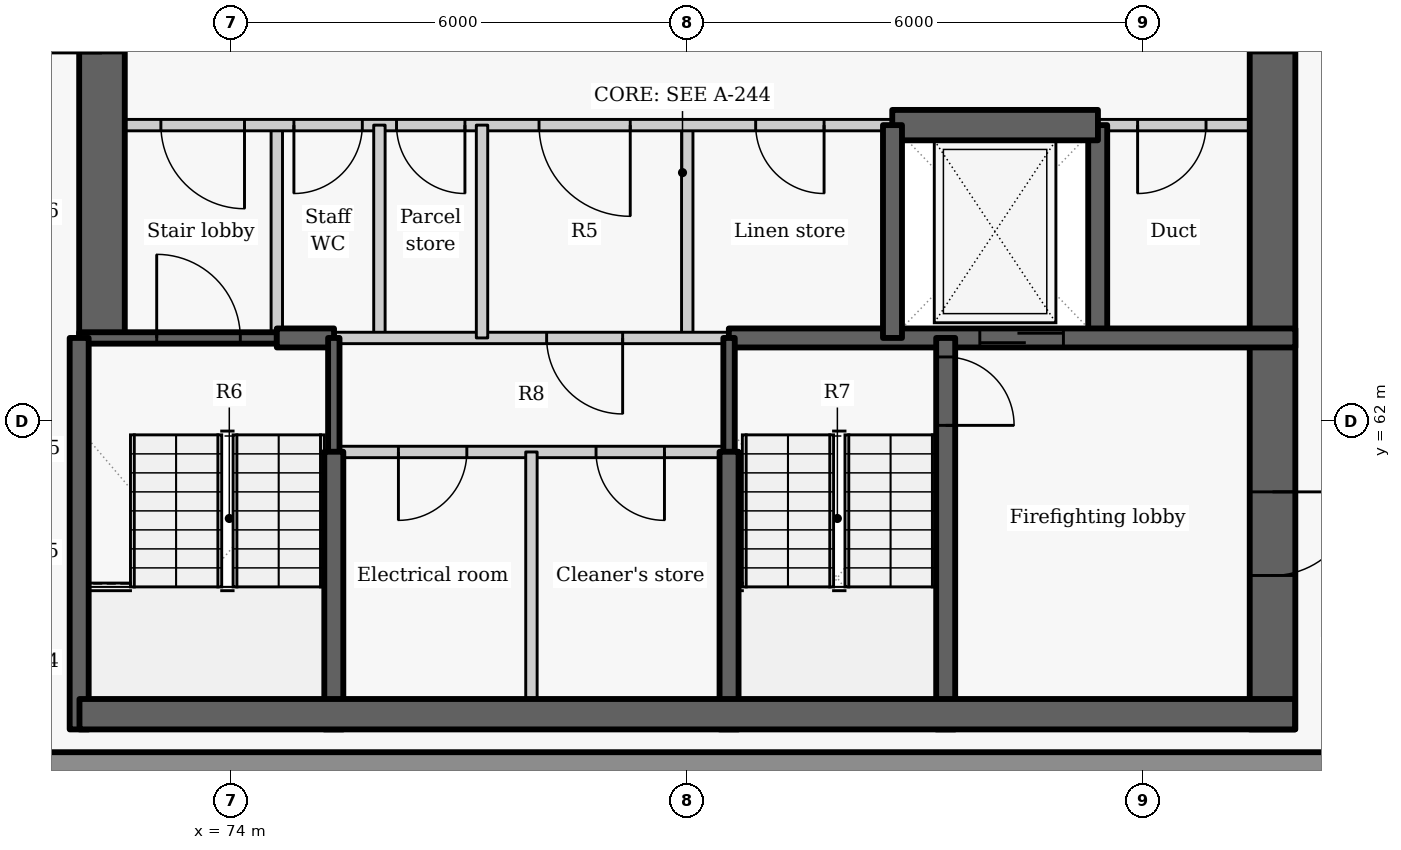
"""IFC4 building model, lengths in metres.
Left out: names, types, materials, properties, quantities, classifications, styles, units other than length and angle.
Written with IfcOpenShell. Run it as: python <this file> out.ifc"""

import sys

from ifc_helpers import new_model, si_unit, direction, frame, frame_2d, origin, place, context, subcontext, project, spatial, rectangle, extrude, element, fill, save


model = new_model("IFC4")
c1 = context("Model", 3, precision=1e-05, world=origin(), true_north=direction((0.0, 1.0)))
c2 = subcontext(c1, "Body", "Model", "MODEL_VIEW")
j1 = project(units=[si_unit("LENGTHUNIT", "METRE"), si_unit("PLANEANGLEUNIT", "RADIAN")], contexts=[c1])
p1 = place(None, origin())
s1 = spatial("IfcSite", under=j1, at=p1, CompositionType="ELEMENT")
p2 = place(p1, origin())
s2 = spatial("IfcBuilding", under=s1, at=p2, CompositionType="ELEMENT")
p3 = place(p2, frame((0.0, 0.0, 269.1)))
s3 = spatial("IfcBuildingStorey", under=s2, at=p3, CompositionType="ELEMENT", Elevation=269.1)
p4 = place(p3, frame((70.501, 57.5, 0.0), z_axis=(0.0, 0.0, 1.0), x_axis=(1.0, 0.0, 0.0)))
e1 = element("IfcWall", 1, at=p4, inside=s3, PredefinedType="SOLIDWALL", context=c2, shape_type="SweptSolid", body=[
    extrude(rectangle(XDim=18.993, YDim=0.3, at=frame_2d((9.496, 0.0))), origin(), (0.0, 0.0, 1.0), 2.125),
])
p5 = place(p3, frame((74.6, 63.1, 0.0), z_axis=(0.0, 0.0, 1.0), x_axis=(0.0, 1.0, 0.0)))
e2 = element("IfcWall", 2, at=p5, inside=s3, PredefinedType="PARTITIONING", context=c2, shape_type="SweptSolid", body=[
    extrude(rectangle(XDim=2.8, YDim=0.15, at=frame_2d((1.4, 0.0))), origin(), (0.0, 0.0, 1.0), 3.025),
])
p6 = place(p3, frame((72.3, 63.1, -0.275), z_axis=(0.0, 0.0, 1.0), x_axis=(0.0, 1.0, 0.0)))
e3 = element("IfcWall", 3, at=p6, inside=s3, PredefinedType="SHEAR", context=c2, shape_type="SweptSolid", body=[
    extrude(rectangle(XDim=9.1, YDim=0.6, at=frame_2d((4.55, 0.0))), origin(), (0.0, 0.0, 1.0), 3.3),
])
p7 = place(p6, frame((3.75, 0.0, 0.275)))
e4 = element("IfcOpeningElement", 4, at=p7, cuts=e3, PredefinedType="OPENING", context=c2, shape_type="SweptSolid", body=[
    extrude(rectangle(XDim=1.5, YDim=2.1, at=frame_2d((0.75, 1.05))), frame((0.0, 0.31, 0.0), z_axis=(0.0, -1.0, 0.0), x_axis=(1.0, 0.0, 0.0)), (0.0, 0.0, 1.0), 0.62),
])
p8 = place(p3, frame((85.4, 63.1, -0.275), z_axis=(0.0, 0.0, 1.0), x_axis=(0.0, 1.0, 0.0)))
e5 = element("IfcWall", 5, at=p8, inside=s3, PredefinedType="SHEAR", context=c2, shape_type="SweptSolid", body=[
    extrude(rectangle(XDim=2.8, YDim=0.25, at=frame_2d((1.4, 0.0))), origin(), (0.0, 0.0, 1.0), 3.3),
])
p9 = place(p3, frame((87.7, 72.2, -0.275), z_axis=(0.0, 0.0, 1.0), x_axis=(0.0, -1.0, 0.0)))
e6 = element("IfcWall", 6, at=p9, inside=s3, PredefinedType="SHEAR", context=c2, shape_type="SweptSolid", body=[
    extrude(rectangle(XDim=14.25, YDim=0.6, at=frame_2d((7.125, 0.0))), origin(), (0.0, 0.0, 1.0), 3.3),
])
p10 = place(p9, frame((3.85, 0.0, 0.275)))
e7 = element("IfcOpeningElement", 7, at=p10, cuts=e6, PredefinedType="OPENING", context=c2, shape_type="SweptSolid", body=[
    extrude(rectangle(XDim=1.5, YDim=2.1, at=frame_2d((0.75, 1.05))), frame((0.0, 0.31, 0.0), z_axis=(0.0, -1.0, 0.0), x_axis=(1.0, 0.0, 0.0)), (0.0, 0.0, 1.0), 0.62),
])
p11 = place(p9, frame((11.125, 0.0, 0.275)))
e8 = element("IfcOpeningElement", 8, at=p11, cuts=e6, PredefinedType="OPENING", context=c2, shape_type="SweptSolid", body=[
    extrude(rectangle(XDim=1.1, YDim=2.1, at=frame_2d((0.55, 1.05))), frame((0.0, 0.31, 0.0), z_axis=(0.0, -1.0, 0.0), x_axis=(1.0, 0.0, 0.0)), (0.0, 0.0, 1.0), 0.62),
])
p12 = place(p3, frame((80.0, 63.1, 0.0), z_axis=(0.0, 0.0, 1.0), x_axis=(0.0, 1.0, 0.0)))
e9 = element("IfcWall", 9, at=p12, inside=s3, PredefinedType="PARTITIONING", context=c2, shape_type="SweptSolid", body=[
    extrude(rectangle(XDim=2.8, YDim=0.15, at=frame_2d((1.4, 0.0))), origin(), (0.0, 0.0, 1.0), 3.025),
])
p13 = place(p3, frame((82.703, 65.9, 0.0), z_axis=(0.0, 0.0, 1.0), x_axis=(-1.0, 0.0, 0.0)))
e10 = element("IfcWall", 10, at=p13, inside=s3, PredefinedType="PARTITIONING", context=c2, shape_type="SweptSolid", body=[
    extrude(rectangle(XDim=10.703, YDim=0.15, at=frame_2d((5.352, 0.0))), origin(), (0.0, 0.0, 1.0), 3.025),
])
p14 = place(p13, frame((8.528, 0.0, 0.0)))
e11 = element("IfcOpeningElement", 11, at=p14, cuts=e10, PredefinedType="OPENING", context=c2, shape_type="SweptSolid", body=[
    extrude(rectangle(XDim=1.1, YDim=2.1, at=frame_2d((0.55, 1.05))), frame((0.0, 0.085, 0.0), z_axis=(0.0, -1.0, 0.0), x_axis=(1.0, 0.0, 0.0)), (0.0, 0.0, 1.0), 0.17),
])
p15 = place(p13, frame((6.978, 0.0, 0.0)))
e12 = element("IfcOpeningElement", 12, at=p15, cuts=e10, PredefinedType="OPENING", context=c2, shape_type="SweptSolid", body=[
    extrude(rectangle(XDim=0.9, YDim=2.1, at=frame_2d((0.45, 1.05))), frame((0.0, 0.085, 0.0), z_axis=(0.0, -1.0, 0.0), x_axis=(1.0, 0.0, 0.0)), (0.0, 0.0, 1.0), 0.17),
])
p16 = place(p13, frame((5.628, 0.0, 0.0)))
e13 = element("IfcOpeningElement", 13, at=p16, cuts=e10, PredefinedType="OPENING", context=c2, shape_type="SweptSolid", body=[
    extrude(rectangle(XDim=0.9, YDim=2.1, at=frame_2d((0.45, 1.05))), frame((0.0, 0.085, 0.0), z_axis=(0.0, -1.0, 0.0), x_axis=(1.0, 0.0, 0.0)), (0.0, 0.0, 1.0), 0.17),
])
p17 = place(p13, frame((3.453, 0.0, 0.0)))
e14 = element("IfcOpeningElement", 14, at=p17, cuts=e10, PredefinedType="OPENING", context=c2, shape_type="SweptSolid", body=[
    extrude(rectangle(XDim=1.2, YDim=2.1, at=frame_2d((0.6, 1.05))), frame((0.0, 0.085, 0.0), z_axis=(0.0, -1.0, 0.0), x_axis=(1.0, 0.0, 0.0)), (0.0, 0.0, 1.0), 0.17),
])
p18 = place(p13, frame((0.903, 0.0, 0.0)))
e15 = element("IfcOpeningElement", 15, at=p18, cuts=e10, PredefinedType="OPENING", context=c2, shape_type="SweptSolid", body=[
    extrude(rectangle(XDim=0.9, YDim=2.1, at=frame_2d((0.45, 1.05))), frame((0.0, 0.085, 0.0), z_axis=(0.0, -1.0, 0.0), x_axis=(1.0, 0.0, 0.0)), (0.0, 0.0, 1.0), 0.17),
])
p19 = place(p3, frame((88.0, 65.9, 0.0), z_axis=(0.0, 0.0, 1.0), x_axis=(-1.0, 0.0, 0.0)))
e16 = element("IfcWall", 16, at=p19, inside=s3, PredefinedType="PARTITIONING", context=c2, shape_type="SweptSolid", body=[
    extrude(rectangle(XDim=2.603, YDim=0.15, at=frame_2d((1.302, 0.0))), origin(), (0.0, 0.0, 1.0), 3.025),
])
p20 = place(p19, frame((1.175, 0.0, 0.0)))
e17 = element("IfcOpeningElement", 17, at=p20, cuts=e16, PredefinedType="OPENING", context=c2, shape_type="SweptSolid", body=[
    extrude(rectangle(XDim=0.9, YDim=2.1, at=frame_2d((0.45, 1.05))), frame((0.0, 0.085, 0.0), z_axis=(0.0, -1.0, 0.0), x_axis=(1.0, 0.0, 0.0)), (0.0, 0.0, 1.0), 0.17),
])
p21 = place(p3, frame((82.697, 65.9, -0.275), z_axis=(0.0, 0.0, 1.0), x_axis=(1.0, 0.0, 0.0)))
e18 = element("IfcWall", 18, at=p21, inside=s3, PredefinedType="SHEAR", context=c2, shape_type="SweptSolid", body=[
    extrude(rectangle(XDim=2.706, YDim=0.4, at=frame_2d((1.353, 0.0))), origin(), (0.0, 0.0, 1.0), 3.3),
])
p22 = place(p3, frame((72.0, 63.1, -0.275), z_axis=(0.0, 0.0, 1.0), x_axis=(1.0, 0.0, 0.0)))
e19 = element("IfcWall", 19, at=p22, inside=s3, PredefinedType="SHEAR", context=c2, shape_type="SweptSolid", body=[
    extrude(rectangle(XDim=2.6, YDim=0.15, at=frame_2d((1.3, 0.0))), origin(), (0.0, 0.0, 1.0), 3.3),
])
p23 = place(p22, frame((1.02, 0.0, 0.275)))
e20 = element("IfcOpeningElement", 20, at=p23, cuts=e19, PredefinedType="OPENING", context=c2, shape_type="SweptSolid", body=[
    extrude(rectangle(XDim=1.1, YDim=2.1, at=frame_2d((0.55, 1.05))), frame((0.0, 0.085, 0.0), z_axis=(0.0, -1.0, 0.0), x_axis=(1.0, 0.0, 0.0)), (0.0, 0.0, 1.0), 0.17),
])
p24 = place(p3, frame((75.95, 63.1, 0.0), z_axis=(0.0, 0.0, 1.0), x_axis=(0.0, 1.0, 0.0)))
e21 = element("IfcWall", 21, at=p24, inside=s3, PredefinedType="PARTITIONING", context=c2, shape_type="SweptSolid", body=[
    extrude(rectangle(XDim=2.8, YDim=0.15, at=frame_2d((1.4, 0.0))), origin(), (0.0, 0.0, 1.0), 3.025),
])
p25 = place(p3, frame((74.6, 63.1, -0.275), z_axis=(0.0, 0.0, 1.0), x_axis=(1.0, 0.0, 0.0)))
e22 = element("IfcWall", 22, at=p25, inside=s3, PredefinedType="SHEAR", context=c2, shape_type="SweptSolid", body=[
    extrude(rectangle(XDim=0.753, YDim=0.25, at=frame_2d((0.376, 0.0))), origin(), (0.0, 0.0, 1.0), 3.3),
])
p26 = place(p3, frame((80.547, 63.1, -0.275), z_axis=(0.0, 0.0, 1.0), x_axis=(1.0, 0.0, 0.0)))
e23 = element("IfcWall", 23, at=p26, inside=s3, PredefinedType="SHEAR", context=c2, shape_type="SweptSolid", body=[
    extrude(rectangle(XDim=7.453, YDim=0.25, at=frame_2d((3.727, 0.0))), origin(), (0.0, 0.0, 1.0), 3.3),
])
p27 = place(p26, frame((3.302, 0.0, 0.275)))
e24 = element("IfcOpeningElement", 24, at=p27, cuts=e23, PredefinedType="OPENING", context=c2, shape_type="SweptSolid", body=[
    extrude(rectangle(XDim=1.1, YDim=2.1, at=frame_2d((0.55, 1.05))), frame((0.0, 0.135, 0.0), z_axis=(0.0, -1.0, 0.0), x_axis=(1.0, 0.0, 0.0)), (0.0, 0.0, 1.0), 0.27),
])
p28 = place(p3, frame((80.553, 63.1, 0.0), z_axis=(0.0, 0.0, 1.0), x_axis=(-1.0, 0.0, 0.0)))
e25 = element("IfcWall", 25, at=p28, inside=s3, PredefinedType="PARTITIONING", context=c2, shape_type="SweptSolid", body=[
    extrude(rectangle(XDim=5.206, YDim=0.15, at=frame_2d((2.603, 0.0))), origin(), (0.0, 0.0, 1.0), 3.025),
])
p29 = place(p28, frame((1.403, 0.0, 0.0)))
e26 = element("IfcOpeningElement", 26, at=p29, cuts=e25, PredefinedType="OPENING", context=c2, shape_type="SweptSolid", body=[
    extrude(rectangle(XDim=1.0, YDim=2.1, at=frame_2d((0.5, 1.05))), frame((0.0, 0.085, 0.0), z_axis=(0.0, -1.0, 0.0), x_axis=(1.0, 0.0, 0.0)), (0.0, 0.0, 1.0), 0.17),
])
p30 = place(p3, frame((77.3, 63.1, 0.0), z_axis=(0.0, 0.0, 1.0), x_axis=(0.0, 1.0, 0.0)))
e27 = element("IfcWall", 27, at=p30, inside=s3, PredefinedType="PARTITIONING", context=c2, shape_type="SweptSolid", body=[
    extrude(rectangle(XDim=2.8, YDim=0.15, at=frame_2d((1.4, 0.0))), origin(), (0.0, 0.0, 1.0), 3.025),
])
p31 = place(p3, frame((82.7, 63.1, -0.275), z_axis=(0.0, 0.0, 1.0), x_axis=(0.0, 1.0, 0.0)))
e28 = element("IfcWall", 28, at=p31, inside=s3, PredefinedType="SHEAR", context=c2, shape_type="SweptSolid", body=[
    extrude(rectangle(XDim=2.8, YDim=0.25, at=frame_2d((1.4, 0.0))), origin(), (0.0, 0.0, 1.0), 3.3),
])
p32 = place(p3, frame((75.35, 61.597, -0.275), z_axis=(0.0, 0.0, 1.0), x_axis=(0.0, 1.0, 0.0)))
e29 = element("IfcWall", 29, at=p32, inside=s3, PredefinedType="SHEAR", context=c2, shape_type="SweptSolid", body=[
    extrude(rectangle(XDim=1.503, YDim=0.15, at=frame_2d((0.751, 0.0))), origin(), (0.0, 0.0, 1.0), 3.3),
])
p33 = place(p3, frame((75.35, 57.95, -0.275), z_axis=(0.0, 0.0, 1.0), x_axis=(0.0, 1.0, 0.0)))
e30 = element("IfcWall", 30, at=p33, inside=s3, PredefinedType="SHEAR", context=c2, shape_type="SweptSolid", body=[
    extrude(rectangle(XDim=3.653, YDim=0.25, at=frame_2d((1.827, 0.0))), origin(), (0.0, 0.0, 1.0), 3.3),
])
p34 = place(p3, frame((72.0, 57.95, -0.275), z_axis=(0.0, 0.0, 1.0), x_axis=(0.0, 1.0, 0.0)))
e31 = element("IfcWall", 31, at=p34, inside=s3, PredefinedType="SHEAR", context=c2, shape_type="SweptSolid", body=[
    extrude(rectangle(XDim=5.15, YDim=0.25, at=frame_2d((2.575, 0.0))), origin(), (0.0, 0.0, 1.0), 3.3),
])
p35 = place(p3, frame((83.4, 63.1, -0.275), z_axis=(0.0, 0.0, 1.0), x_axis=(0.0, -1.0, 0.0)))
e32 = element("IfcWall", 32, at=p35, inside=s3, PredefinedType="SHEAR", context=c2, shape_type="SweptSolid", body=[
    extrude(rectangle(XDim=5.15, YDim=0.25, at=frame_2d((2.575, 0.0))), origin(), (0.0, 0.0, 1.0), 3.3),
])
p36 = place(p35, frame((0.25, 0.0, 0.275)))
e33 = element("IfcOpeningElement", 33, at=p36, cuts=e32, PredefinedType="OPENING", context=c2, shape_type="SweptSolid", body=[
    extrude(rectangle(XDim=0.9, YDim=2.1, at=frame_2d((0.45, 1.05))), frame((0.0, 0.135, 0.0), z_axis=(0.0, -1.0, 0.0), x_axis=(1.0, 0.0, 0.0)), (0.0, 0.0, 1.0), 0.27),
])
p37 = place(p3, frame((80.55, 61.597, -0.275), z_axis=(0.0, 0.0, 1.0), x_axis=(0.0, 1.0, 0.0)))
e34 = element("IfcWall", 34, at=p37, inside=s3, PredefinedType="SHEAR", context=c2, shape_type="SweptSolid", body=[
    extrude(rectangle(XDim=1.503, YDim=0.15, at=frame_2d((0.751, 0.0))), origin(), (0.0, 0.0, 1.0), 3.3),
])
p38 = place(p3, frame((80.55, 57.95, -0.275), z_axis=(0.0, 0.0, 1.0), x_axis=(0.0, 1.0, 0.0)))
e35 = element("IfcWall", 35, at=p38, inside=s3, PredefinedType="SHEAR", context=c2, shape_type="SweptSolid", body=[
    extrude(rectangle(XDim=3.653, YDim=0.25, at=frame_2d((1.827, 0.0))), origin(), (0.0, 0.0, 1.0), 3.3),
])
p39 = place(p3, frame((80.55, 61.6, 0.0), z_axis=(0.0, 0.0, 1.0), x_axis=(-1.0, 0.0, 0.0)))
e36 = element("IfcWall", 36, at=p39, inside=s3, PredefinedType="PARTITIONING", context=c2, shape_type="SweptSolid", body=[
    extrude(rectangle(XDim=5.2, YDim=0.15, at=frame_2d((2.6, 0.0))), origin(), (0.0, 0.0, 1.0), 3.025),
])
p40 = place(p39, frame((3.45, 0.0, 0.0)))
e37 = element("IfcOpeningElement", 37, at=p40, cuts=e36, PredefinedType="OPENING", context=c2, shape_type="SweptSolid", body=[
    extrude(rectangle(XDim=0.9, YDim=2.1, at=frame_2d((0.45, 1.05))), frame((0.0, 0.085, 0.0), z_axis=(0.0, -1.0, 0.0), x_axis=(1.0, 0.0, 0.0)), (0.0, 0.0, 1.0), 0.17),
])
p41 = place(p39, frame((0.85, 0.0, 0.0)))
e38 = element("IfcOpeningElement", 38, at=p41, cuts=e36, PredefinedType="OPENING", context=c2, shape_type="SweptSolid", body=[
    extrude(rectangle(XDim=0.9, YDim=2.1, at=frame_2d((0.45, 1.05))), frame((0.0, 0.085, 0.0), z_axis=(0.0, -1.0, 0.0), x_axis=(1.0, 0.0, 0.0)), (0.0, 0.0, 1.0), 0.17),
])
p42 = place(p3, frame((77.95, 57.95, 0.0), z_axis=(0.0, 0.0, 1.0), x_axis=(0.0, 1.0, 0.0)))
e39 = element("IfcWall", 39, at=p42, inside=s3, PredefinedType="PARTITIONING", context=c2, shape_type="SweptSolid", body=[
    extrude(rectangle(XDim=3.65, YDim=0.15, at=frame_2d((1.825, 0.0))), origin(), (0.0, 0.0, 1.0), 3.025),
])
p43 = place(p3, frame((72.004, 58.15, -0.275), z_axis=(0.0, 0.0, 1.0), x_axis=(1.0, 0.0, 0.0)))
e40 = element("IfcWall", 40, at=p43, inside=s3, PredefinedType="SHEAR", context=c2, shape_type="SweptSolid", body=[
    extrude(rectangle(XDim=15.992, YDim=0.4, at=frame_2d((7.996, 0.0))), origin(), (0.0, 0.0, 1.0), 3.3),
])
p44 = place(p14, origin())
e41 = element("IfcDoor", 41, at=p44, inside=s3, OperationType="SINGLE_SWING_LEFT", PredefinedType="DOOR", context=c2, shape_type="SweptSolid", body=[
    extrude(rectangle(XDim=1.1, YDim=2.1, at=frame_2d((0.55, 1.05))), frame((0.0, 0.025, 0.0), z_axis=(0.0, -1.0, 0.0), x_axis=(1.0, 0.0, 0.0)), (0.0, 0.0, 1.0), 0.05),
])
fill(e11, e41)
p45 = place(p15, origin())
e42 = element("IfcDoor", 42, at=p45, inside=s3, OperationType="SINGLE_SWING_RIGHT", PredefinedType="DOOR", context=c2, shape_type="SweptSolid", body=[
    extrude(rectangle(XDim=0.9, YDim=2.1, at=frame_2d((0.45, 1.05))), frame((0.0, 0.025, 0.0), z_axis=(0.0, -1.0, 0.0), x_axis=(1.0, 0.0, 0.0)), (0.0, 0.0, 1.0), 0.05),
])
fill(e12, e42)
p46 = place(p16, origin())
e43 = element("IfcDoor", 43, at=p46, inside=s3, OperationType="SINGLE_SWING_LEFT", PredefinedType="DOOR", context=c2, shape_type="SweptSolid", body=[
    extrude(rectangle(XDim=0.9, YDim=2.1, at=frame_2d((0.45, 1.05))), frame((0.0, 0.025, 0.0), z_axis=(0.0, -1.0, 0.0), x_axis=(1.0, 0.0, 0.0)), (0.0, 0.0, 1.0), 0.05),
])
fill(e13, e43)
p47 = place(p17, origin())
e44 = element("IfcDoor", 44, at=p47, inside=s3, OperationType="DOUBLE_DOOR_SINGLE_SWING", PredefinedType="DOOR", context=c2, shape_type="SweptSolid", body=[
    extrude(rectangle(XDim=1.2, YDim=2.1, at=frame_2d((0.6, 1.05))), frame((0.0, 0.025, 0.0), z_axis=(0.0, -1.0, 0.0), x_axis=(1.0, 0.0, 0.0)), (0.0, 0.0, 1.0), 0.05),
])
fill(e14, e44)
p48 = place(p18, origin())
e45 = element("IfcDoor", 45, at=p48, inside=s3, OperationType="SINGLE_SWING_LEFT", PredefinedType="DOOR", context=c2, shape_type="SweptSolid", body=[
    extrude(rectangle(XDim=0.9, YDim=2.1, at=frame_2d((0.45, 1.05))), frame((0.0, 0.025, 0.0), z_axis=(0.0, -1.0, 0.0), x_axis=(1.0, 0.0, 0.0)), (0.0, 0.0, 1.0), 0.05),
])
fill(e15, e45)
p49 = place(p27, origin())
e46 = element("IfcDoor", 46, at=p49, inside=s3, OperationType="SLIDING_TO_LEFT", PredefinedType="DOOR", context=c2, shape_type="SweptSolid", body=[
    extrude(rectangle(XDim=1.1, YDim=2.1, at=frame_2d((0.55, 1.05))), frame((0.0, 0.025, 0.0), z_axis=(0.0, -1.0, 0.0), x_axis=(1.0, 0.0, 0.0)), (0.0, 0.0, 1.0), 0.05),
])
fill(e24, e46)
p50 = place(p20, origin())
e47 = element("IfcDoor", 47, at=p50, inside=s3, OperationType="SINGLE_SWING_RIGHT", PredefinedType="DOOR", context=c2, shape_type="SweptSolid", body=[
    extrude(rectangle(XDim=0.9, YDim=2.1, at=frame_2d((0.45, 1.05))), frame((0.0, 0.025, 0.0), z_axis=(0.0, -1.0, 0.0), x_axis=(1.0, 0.0, 0.0)), (0.0, 0.0, 1.0), 0.05),
])
fill(e17, e47)
p51 = place(p29, origin())
e48 = element("IfcDoor", 48, at=p51, inside=s3, OperationType="SINGLE_SWING_LEFT", PredefinedType="DOOR", context=c2, shape_type="SweptSolid", body=[
    extrude(rectangle(XDim=1.0, YDim=2.1, at=frame_2d((0.5, 1.05))), frame((0.0, 0.025, 0.0), z_axis=(0.0, -1.0, 0.0), x_axis=(1.0, 0.0, 0.0)), (0.0, 0.0, 1.0), 0.05),
])
fill(e26, e48)
p52 = place(p40, origin())
e49 = element("IfcDoor", 49, at=p52, inside=s3, OperationType="SINGLE_SWING_RIGHT", PredefinedType="DOOR", context=c2, shape_type="SweptSolid", body=[
    extrude(rectangle(XDim=0.9, YDim=2.1, at=frame_2d((0.45, 1.05))), frame((0.0, 0.025, 0.0), z_axis=(0.0, -1.0, 0.0), x_axis=(1.0, 0.0, 0.0)), (0.0, 0.0, 1.0), 0.05),
])
fill(e37, e49)
p53 = place(p41, origin())
e50 = element("IfcDoor", 50, at=p53, inside=s3, OperationType="SINGLE_SWING_LEFT", PredefinedType="DOOR", context=c2, shape_type="SweptSolid", body=[
    extrude(rectangle(XDim=0.9, YDim=2.1, at=frame_2d((0.45, 1.05))), frame((0.0, 0.025, 0.0), z_axis=(0.0, -1.0, 0.0), x_axis=(1.0, 0.0, 0.0)), (0.0, 0.0, 1.0), 0.05),
])
fill(e38, e50)
p54 = place(p23, origin())
e51 = element("IfcDoor", 51, at=p54, inside=s3, OperationType="SINGLE_SWING_LEFT", PredefinedType="DOOR", context=c2, shape_type="SweptSolid", body=[
    extrude(rectangle(XDim=1.1, YDim=2.1, at=frame_2d((0.55, 1.05))), frame((0.0, 0.025, 0.0), z_axis=(0.0, -1.0, 0.0), x_axis=(1.0, 0.0, 0.0)), (0.0, 0.0, 1.0), 0.05),
])
fill(e20, e51)
p55 = place(p36, origin())
e52 = element("IfcDoor", 52, at=p55, inside=s3, OperationType="SINGLE_SWING_RIGHT", PredefinedType="DOOR", context=c2, shape_type="SweptSolid", body=[
    extrude(rectangle(XDim=0.9, YDim=2.1, at=frame_2d((0.45, 1.05))), frame((0.0, 0.025, 0.0), z_axis=(0.0, -1.0, 0.0), x_axis=(1.0, 0.0, 0.0)), (0.0, 0.0, 1.0), 0.05),
])
fill(e33, e52)
p56 = place(p10, origin())
e53 = element("IfcDoor", 53, at=p56, inside=s3, OperationType="DOUBLE_DOOR_SINGLE_SWING", PredefinedType="DOOR", context=c2, shape_type="SweptSolid", body=[
    extrude(rectangle(XDim=1.5, YDim=2.1, at=frame_2d((0.75, 1.05))), frame((0.0, 0.025, 0.0), z_axis=(0.0, -1.0, 0.0), x_axis=(1.0, 0.0, 0.0)), (0.0, 0.0, 1.0), 0.05),
])
fill(e7, e53)
p57 = place(p11, origin())
e54 = element("IfcDoor", 54, at=p57, inside=s3, OperationType="SINGLE_SWING_LEFT", PredefinedType="DOOR", context=c2, shape_type="SweptSolid", body=[
    extrude(rectangle(XDim=1.1, YDim=2.1, at=frame_2d((0.55, 1.05))), frame((0.0, 0.025, 0.0), z_axis=(0.0, -1.0, 0.0), x_axis=(1.0, 0.0, 0.0)), (0.0, 0.0, 1.0), 0.05),
])
fill(e8, e54)
save(model, sys.argv[1])
